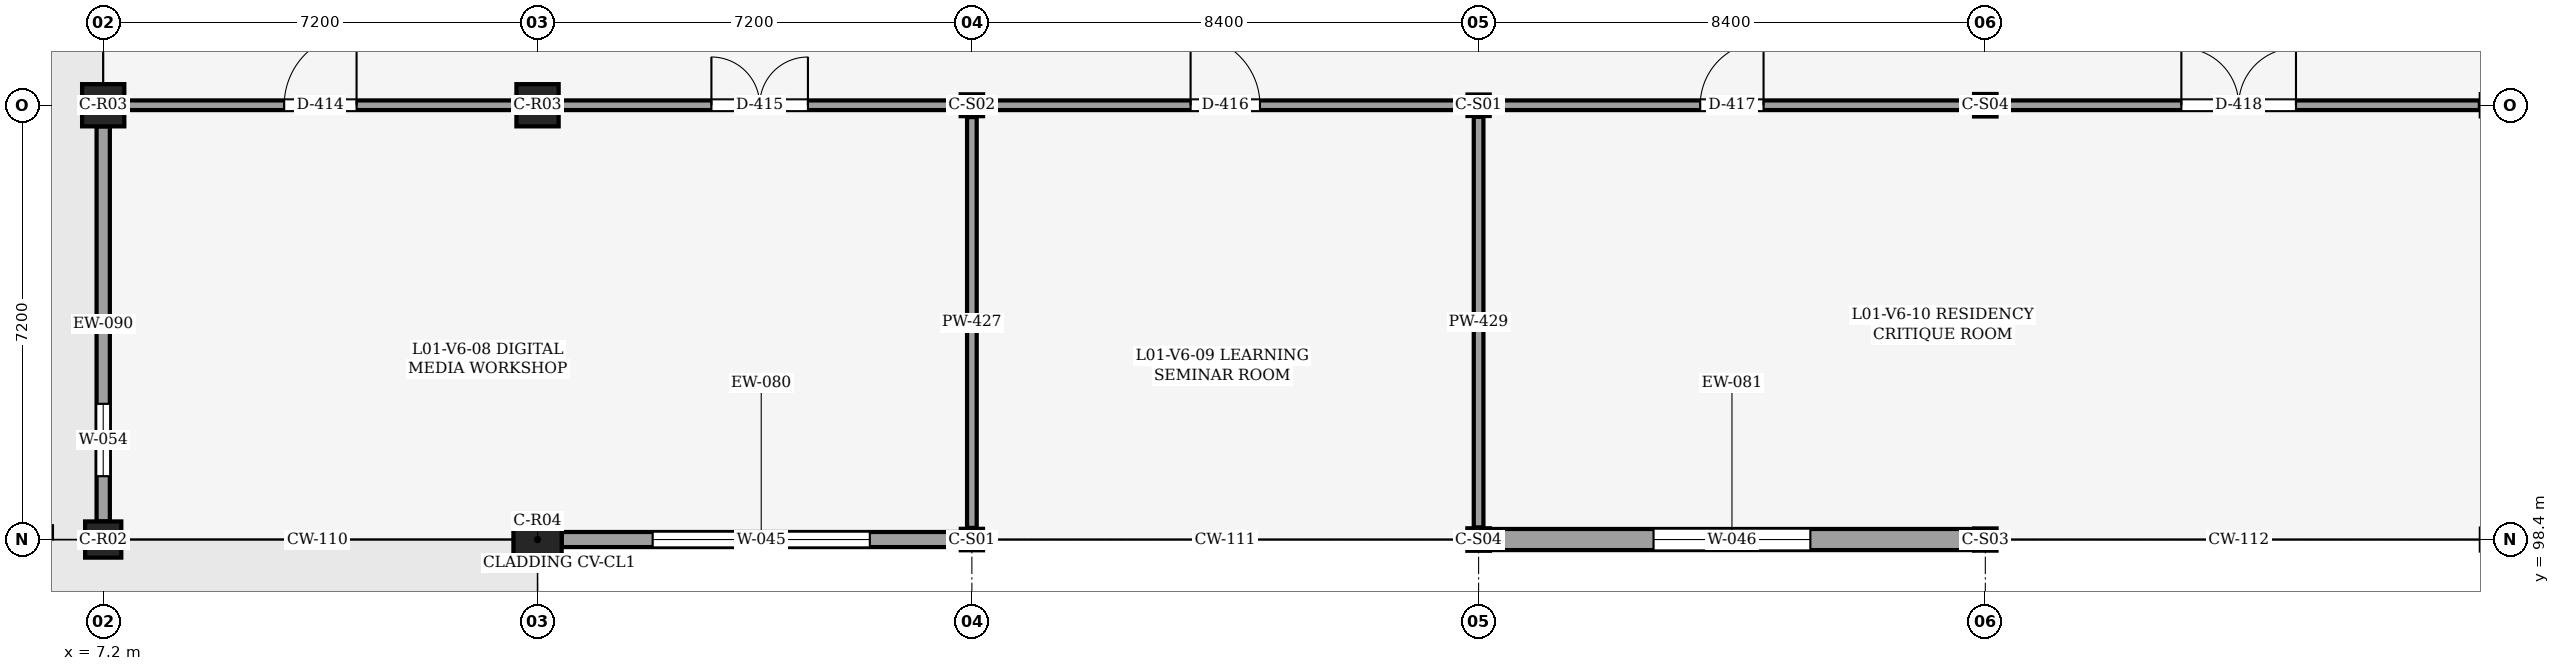
"""IFC4 building model, lengths in metres.
Left out: names, types, materials, properties, quantities, classifications, styles, units other than length and angle.
Written with IfcOpenShell. Run it as: python <this file> out.ifc"""

import sys

from ifc_helpers import new_model, si_unit, direction, frame, frame_2d, origin, origin_2d, place, context, subcontext, project, spatial, rectangle, i_section, extrude, element, fill, save


model = new_model("IFC4")
c1 = context("Model", 3, precision=1e-05, world=origin(), true_north=direction((0.0, 1.0)))
c2 = subcontext(c1, "Body", "Model", "MODEL_VIEW")
j1 = project(units=[si_unit("LENGTHUNIT", "METRE"), si_unit("PLANEANGLEUNIT", "RADIAN")], contexts=[c1])
p1 = place(None, origin())
s1 = spatial("IfcSite", under=j1, at=p1, CompositionType="ELEMENT")
p2 = place(p1, origin())
s2 = spatial("IfcBuilding", under=s1, at=p2, CompositionType="ELEMENT")
p3 = place(p2, frame((0.0, 0.0, 5.4)))
s3 = spatial("IfcBuildingStorey", under=s2, at=p3, CompositionType="ELEMENT", Elevation=5.4)
p4 = place(p3, frame((7.2, 98.4, 0.0), z_axis=(0.0, 0.0, 1.0), x_axis=(1.0, 0.0, 0.0)))
e1 = element("IfcColumn", 1, at=p4, inside=s3, PredefinedType="COLUMN", context=c2, shape_type="SweptSolid", body=[
    extrude(rectangle(XDim=0.6, YDim=0.6, at=origin_2d()), origin(), (0.0, 0.0, 1.0), 4.8),
])
p5 = place(p3, frame((7.2, 105.6, 0.0), z_axis=(0.0, 0.0, 1.0), x_axis=(1.0, 0.0, 0.0)))
e2 = element("IfcColumn", 2, at=p5, inside=s3, PredefinedType="COLUMN", context=c2, shape_type="SweptSolid", body=[
    extrude(rectangle(XDim=0.7, YDim=0.7, at=origin_2d()), origin(), (0.0, 0.0, 1.0), 4.8),
])
p6 = place(p3, frame((14.4, 98.4, 0.0), z_axis=(0.0, 0.0, 1.0), x_axis=(1.0, 0.0, 0.0)))
e3 = element("IfcColumn", 3, at=p6, inside=s3, PredefinedType="COLUMN", context=c2, shape_type="SweptSolid", body=[
    extrude(rectangle(XDim=0.8, YDim=0.8, at=origin_2d()), origin(), (0.0, 0.0, 1.0), 4.8),
])
p7 = place(p3, frame((14.4, 105.6, 0.0), z_axis=(0.0, 0.0, 1.0), x_axis=(1.0, 0.0, 0.0)))
e4 = element("IfcColumn", 4, at=p7, inside=s3, PredefinedType="COLUMN", context=c2, shape_type="SweptSolid", body=[
    extrude(rectangle(XDim=0.7, YDim=0.7, at=origin_2d()), origin(), (0.0, 0.0, 1.0), 4.8),
])
p8 = place(p3, frame((21.6, 98.4, 0.0), z_axis=(0.0, 0.0, 1.0), x_axis=(1.0, 0.0, 0.0)))
e5 = element("IfcColumn", 5, at=p8, inside=s3, PredefinedType="COLUMN", context=c2, shape_type="SweptSolid", body=[
    extrude(i_section(OverallWidth=0.368, OverallDepth=0.356, WebThickness=0.011, FlangeThickness=0.018, FilletRadius=0.025, at=origin_2d()), origin(), (0.0, 0.0, 1.0), 4.8),
])
p9 = place(p3, frame((21.6, 105.6, 0.0), z_axis=(0.0, 0.0, 1.0), x_axis=(1.0, 0.0, 0.0)))
e6 = element("IfcColumn", 6, at=p9, inside=s3, PredefinedType="COLUMN", context=c2, shape_type="SweptSolid", body=[
    extrude(i_section(OverallWidth=0.371, OverallDepth=0.363, WebThickness=0.013, FlangeThickness=0.022, FilletRadius=0.025, at=origin_2d()), origin(), (0.0, 0.0, 1.0), 4.8),
])
p10 = place(p3, frame((30.0, 98.4, 0.0), z_axis=(0.0, 0.0, 1.0), x_axis=(1.0, 0.0, 0.0)))
e7 = element("IfcColumn", 7, at=p10, inside=s3, PredefinedType="COLUMN", context=c2, shape_type="SweptSolid", body=[
    extrude(i_section(OverallWidth=0.373, OverallDepth=0.373, WebThickness=0.016, FlangeThickness=0.026, FilletRadius=0.025, at=origin_2d()), origin(), (0.0, 0.0, 1.0), 4.8),
])
p11 = place(p3, frame((30.0, 105.6, 0.0), z_axis=(0.0, 0.0, 1.0), x_axis=(1.0, 0.0, 0.0)))
e8 = element("IfcColumn", 8, at=p11, inside=s3, PredefinedType="COLUMN", context=c2, shape_type="SweptSolid", body=[
    extrude(i_section(OverallWidth=0.368, OverallDepth=0.356, WebThickness=0.011, FlangeThickness=0.018, FilletRadius=0.025, at=origin_2d()), origin(), (0.0, 0.0, 1.0), 4.8),
])
p12 = place(p3, frame((38.4, 98.4, 0.0), z_axis=(0.0, 0.0, 1.0), x_axis=(1.0, 0.0, 0.0)))
e9 = element("IfcColumn", 9, at=p12, inside=s3, PredefinedType="COLUMN", context=c2, shape_type="SweptSolid", body=[
    extrude(i_section(OverallWidth=0.373, OverallDepth=0.368, WebThickness=0.015, FlangeThickness=0.024, FilletRadius=0.025, at=origin_2d()), origin(), (0.0, 0.0, 1.0), 4.8),
])
p13 = place(p3, frame((38.4, 105.6, 0.0), z_axis=(0.0, 0.0, 1.0), x_axis=(1.0, 0.0, 0.0)))
e10 = element("IfcColumn", 10, at=p13, inside=s3, PredefinedType="COLUMN", context=c2, shape_type="SweptSolid", body=[
    extrude(i_section(OverallWidth=0.373, OverallDepth=0.373, WebThickness=0.016, FlangeThickness=0.026, FilletRadius=0.025, at=origin_2d()), origin(), (0.0, 0.0, 1.0), 4.8),
])
p14 = place(p3, frame((21.416, 98.4, 0.0), z_axis=(0.0, 0.0, 1.0), x_axis=(-1.0, 0.0, 0.0)))
e11 = element("IfcWall", 11, at=p14, inside=s3, PredefinedType="SOLIDWALL", context=c2, shape_type="SweptSolid", body=[
    extrude(rectangle(XDim=6.616, YDim=0.25, at=frame_2d((3.308, 0.0))), origin(), (0.0, 0.0, 1.0), 4.164),
])
p15 = place(p14, frame((1.508, 0.0, 0.9)))
e12 = element("IfcOpeningElement", 12, at=p15, cuts=e11, PredefinedType="OPENING", context=c2, shape_type="SweptSolid", body=[
    extrude(rectangle(XDim=3.6, YDim=1.05, at=frame_2d((1.8, 0.525))), frame((0.0, 0.135, 0.0), z_axis=(0.0, -1.0, 0.0), x_axis=(1.0, 0.0, 0.0)), (0.0, 0.0, 1.0), 0.271),
])
p16 = place(p3, frame((38.213, 98.4, 0.0), z_axis=(0.0, 0.0, 1.0), x_axis=(-1.0, 0.0, 0.0)))
e13 = element("IfcWall", 13, at=p16, inside=s3, PredefinedType="SOLIDWALL", context=c2, shape_type="SweptSolid", body=[
    extrude(rectangle(XDim=8.027, YDim=0.35, at=frame_2d((4.013, 0.0))), origin(), (0.0, 0.0, 1.0), 3.827),
])
p17 = place(p16, frame((2.713, 0.0, 0.85)))
e14 = element("IfcOpeningElement", 14, at=p17, cuts=e13, PredefinedType="OPENING", context=c2, shape_type="SweptSolid", body=[
    extrude(rectangle(XDim=2.6, YDim=1.9, at=frame_2d((1.3, 0.95))), frame((0.0, 0.185, 0.0), z_axis=(0.0, -1.0, 0.0), x_axis=(1.0, 0.0, 0.0)), (0.0, 0.0, 1.0), 0.371),
])
p18 = place(p3, frame((7.2, 98.7, 0.0), z_axis=(0.0, 0.0, 1.0), x_axis=(0.0, 1.0, 0.0)))
e15 = element("IfcWall", 15, at=p18, inside=s3, PredefinedType="SOLIDWALL", context=c2, shape_type="SweptSolid", body=[
    extrude(rectangle(XDim=6.55, YDim=0.22, at=frame_2d((3.275, 0.0))), origin(), (0.0, 0.0, 1.0), 3.913),
])
p19 = place(p18, frame((0.75, 0.0, 0.9)))
e16 = element("IfcOpeningElement", 16, at=p19, cuts=e15, PredefinedType="OPENING", context=c2, shape_type="SweptSolid", body=[
    extrude(rectangle(XDim=1.2, YDim=1.5, at=frame_2d((0.6, 0.75))), frame((0.0, 0.12, 0.0), z_axis=(0.0, -1.0, 0.0), x_axis=(1.0, 0.0, 0.0)), (0.0, 0.0, 1.0), 0.24),
])
p20 = place(p3, frame((7.565, 105.6, 0.0), z_axis=(0.0, 0.0, 1.0), x_axis=(1.0, 0.0, 0.0)))
e17 = element("IfcWall", 17, at=p20, inside=s3, PredefinedType="PARTITIONING", context=c2, shape_type="SweptSolid", body=[
    extrude(rectangle(XDim=6.47, YDim=0.16, at=frame_2d((3.235, 0.0))), origin(), (0.0, 0.0, 1.0), 3.987),
])
p21 = place(p20, frame((2.635, 0.0, 0.0)))
e18 = element("IfcOpeningElement", 18, at=p21, cuts=e17, PredefinedType="OPENING", context=c2, shape_type="SweptSolid", body=[
    extrude(rectangle(XDim=1.2, YDim=2.2, at=frame_2d((0.6, 1.1))), frame((0.0, 0.09, 0.0), z_axis=(0.0, -1.0, 0.0), x_axis=(1.0, 0.0, 0.0)), (0.0, 0.0, 1.0), 0.18),
])
p22 = place(p3, frame((14.765, 105.6, 0.0), z_axis=(0.0, 0.0, 1.0), x_axis=(1.0, 0.0, 0.0)))
e19 = element("IfcWall", 19, at=p22, inside=s3, PredefinedType="PARTITIONING", context=c2, shape_type="SweptSolid", body=[
    extrude(rectangle(XDim=6.635, YDim=0.16, at=frame_2d((3.317, 0.0))), origin(), (0.0, 0.0, 1.0), 4.058),
])
p23 = place(p22, frame((2.517, 0.0, 0.0)))
e20 = element("IfcOpeningElement", 20, at=p23, cuts=e19, PredefinedType="OPENING", context=c2, shape_type="SweptSolid", body=[
    extrude(rectangle(XDim=1.6, YDim=2.35, at=frame_2d((0.8, 1.175))), frame((0.0, 0.09, 0.0), z_axis=(0.0, -1.0, 0.0), x_axis=(1.0, 0.0, 0.0)), (0.0, 0.0, 1.0), 0.18),
])
p24 = place(p3, frame((21.6, 98.593, 0.0), z_axis=(0.0, 0.0, 1.0), x_axis=(0.0, 1.0, 0.0)))
e21 = element("IfcWall", 21, at=p24, inside=s3, PredefinedType="PARTITIONING", context=c2, shape_type="SweptSolid", body=[
    extrude(rectangle(XDim=6.811, YDim=0.16, at=frame_2d((3.405, 0.0))), origin(), (0.0, 0.0, 1.0), 4.058),
])
p25 = place(p3, frame((21.801, 105.6, 0.0), z_axis=(0.0, 0.0, 1.0), x_axis=(1.0, 0.0, 0.0)))
e22 = element("IfcWall", 22, at=p25, inside=s3, PredefinedType="PARTITIONING", context=c2, shape_type="SweptSolid", body=[
    extrude(rectangle(XDim=8.0, YDim=0.16, at=frame_2d((4.0, 0.0))), origin(), (0.0, 0.0, 1.0), 3.827),
])
p26 = place(p25, frame((3.425, 0.0, 0.0)))
e23 = element("IfcOpeningElement", 23, at=p26, cuts=e22, PredefinedType="OPENING", context=c2, shape_type="SweptSolid", body=[
    extrude(rectangle(XDim=1.15, YDim=2.2, at=frame_2d((0.575, 1.1))), frame((0.0, 0.09, 0.0), z_axis=(0.0, -1.0, 0.0), x_axis=(1.0, 0.0, 0.0)), (0.0, 0.0, 1.0), 0.18),
])
p27 = place(p3, frame((30.0, 98.602, 0.0), z_axis=(0.0, 0.0, 1.0), x_axis=(0.0, 1.0, 0.0)))
e24 = element("IfcWall", 24, at=p27, inside=s3, PredefinedType="PARTITIONING", context=c2, shape_type="SweptSolid", body=[
    extrude(rectangle(XDim=6.805, YDim=0.16, at=frame_2d((3.403, 0.0))), origin(), (0.0, 0.0, 1.0), 3.908),
])
p28 = place(p3, frame((30.199, 105.6, 0.0), z_axis=(0.0, 0.0, 1.0), x_axis=(1.0, 0.0, 0.0)))
e25 = element("IfcWall", 25, at=p28, inside=s3, PredefinedType="PARTITIONING", context=c2, shape_type="SweptSolid", body=[
    extrude(rectangle(XDim=8.0, YDim=0.16, at=frame_2d((4.0, 0.0))), origin(), (0.0, 0.0, 1.0), 3.898),
])
p29 = place(p28, frame((3.475, 0.0, 0.0)))
e26 = element("IfcOpeningElement", 26, at=p29, cuts=e25, PredefinedType="OPENING", context=c2, shape_type="SweptSolid", body=[
    extrude(rectangle(XDim=1.05, YDim=2.15, at=frame_2d((0.525, 1.075))), frame((0.0, 0.09, 0.0), z_axis=(0.0, -1.0, 0.0), x_axis=(1.0, 0.0, 0.0)), (0.0, 0.0, 1.0), 0.18),
])
p30 = place(p3, frame((38.602, 105.6, 0.0), z_axis=(0.0, 0.0, 1.0), x_axis=(1.0, 0.0, 0.0)))
e27 = element("IfcWall", 27, at=p30, inside=s3, PredefinedType="PARTITIONING", context=c2, shape_type="SweptSolid", body=[
    extrude(rectangle(XDim=7.997, YDim=0.16, at=frame_2d((3.999, 0.0))), origin(), (0.0, 0.0, 1.0), 3.908),
])
p31 = place(p30, frame((3.049, 0.0, 0.0)))
e28 = element("IfcOpeningElement", 28, at=p31, cuts=e27, PredefinedType="OPENING", context=c2, shape_type="SweptSolid", body=[
    extrude(rectangle(XDim=1.9, YDim=2.45, at=frame_2d((0.95, 1.225))), frame((0.0, 0.09, 0.0), z_axis=(0.0, -1.0, 0.0), x_axis=(1.0, 0.0, 0.0)), (0.0, 0.0, 1.0), 0.18),
])
p32 = place(p15, origin())
e29 = element("IfcWindow", 29, at=p32, inside=s3, PartitioningType="SINGLE_PANEL", PredefinedType="WINDOW", context=c2, shape_type="SweptSolid", body=[
    extrude(rectangle(XDim=3.6, YDim=1.05, at=frame_2d((1.8, 0.525))), frame((0.0, 0.03, 0.0), z_axis=(0.0, -1.0, 0.0), x_axis=(1.0, 0.0, 0.0)), (0.0, 0.0, 1.0), 0.06),
])
fill(e12, e29)
p33 = place(p17, origin())
e30 = element("IfcWindow", 30, at=p33, inside=s3, PartitioningType="SINGLE_PANEL", PredefinedType="WINDOW", context=c2, shape_type="SweptSolid", body=[
    extrude(rectangle(XDim=2.6, YDim=1.9, at=frame_2d((1.3, 0.95))), frame((0.0, 0.03, 0.0), z_axis=(0.0, -1.0, 0.0), x_axis=(1.0, 0.0, 0.0)), (0.0, 0.0, 1.0), 0.06),
])
fill(e14, e30)
p34 = place(p19, origin())
e31 = element("IfcWindow", 31, at=p34, inside=s3, PartitioningType="SINGLE_PANEL", PredefinedType="WINDOW", context=c2, shape_type="SweptSolid", body=[
    extrude(rectangle(XDim=1.2, YDim=1.5, at=frame_2d((0.6, 0.75))), frame((0.0, 0.03, 0.0), z_axis=(0.0, -1.0, 0.0), x_axis=(1.0, 0.0, 0.0)), (0.0, 0.0, 1.0), 0.06),
])
fill(e16, e31)
p35 = place(p21, origin())
e32 = element("IfcDoor", 32, at=p35, inside=s3, OperationType="SINGLE_SWING_RIGHT", PredefinedType="DOOR", context=c2, shape_type="SweptSolid", body=[
    extrude(rectangle(XDim=1.2, YDim=2.2, at=frame_2d((0.6, 1.1))), frame((0.0, 0.025, 0.0), z_axis=(0.0, -1.0, 0.0), x_axis=(1.0, 0.0, 0.0)), (0.0, 0.0, 1.0), 0.05),
])
fill(e18, e32)
p36 = place(p23, origin())
e33 = element("IfcDoor", 33, at=p36, inside=s3, OperationType="DOUBLE_DOOR_SINGLE_SWING", PredefinedType="DOOR", context=c2, shape_type="SweptSolid", body=[
    extrude(rectangle(XDim=1.6, YDim=2.35, at=frame_2d((0.8, 1.175))), frame((0.0, 0.025, 0.0), z_axis=(0.0, -1.0, 0.0), x_axis=(1.0, 0.0, 0.0)), (0.0, 0.0, 1.0), 0.05),
])
fill(e20, e33)
p37 = place(p26, origin())
e34 = element("IfcDoor", 34, at=p37, inside=s3, OperationType="SINGLE_SWING_LEFT", PredefinedType="DOOR", context=c2, shape_type="SweptSolid", body=[
    extrude(rectangle(XDim=1.15, YDim=2.2, at=frame_2d((0.575, 1.1))), frame((0.0, 0.025, 0.0), z_axis=(0.0, -1.0, 0.0), x_axis=(1.0, 0.0, 0.0)), (0.0, 0.0, 1.0), 0.05),
])
fill(e23, e34)
p38 = place(p29, origin())
e35 = element("IfcDoor", 35, at=p38, inside=s3, OperationType="SINGLE_SWING_RIGHT", PredefinedType="DOOR", context=c2, shape_type="SweptSolid", body=[
    extrude(rectangle(XDim=1.05, YDim=2.15, at=frame_2d((0.525, 1.075))), frame((0.0, 0.025, 0.0), z_axis=(0.0, -1.0, 0.0), x_axis=(1.0, 0.0, 0.0)), (0.0, 0.0, 1.0), 0.05),
])
fill(e26, e35)
p39 = place(p31, origin())
e36 = element("IfcDoor", 36, at=p39, inside=s3, OperationType="DOUBLE_DOOR_SINGLE_SWING", PredefinedType="DOOR", context=c2, shape_type="SweptSolid", body=[
    extrude(rectangle(XDim=1.9, YDim=2.45, at=frame_2d((0.95, 1.225))), frame((0.0, 0.025, 0.0), z_axis=(0.0, -1.0, 0.0), x_axis=(1.0, 0.0, 0.0)), (0.0, 0.0, 1.0), 0.05),
])
fill(e28, e36)
save(model, sys.argv[1])
